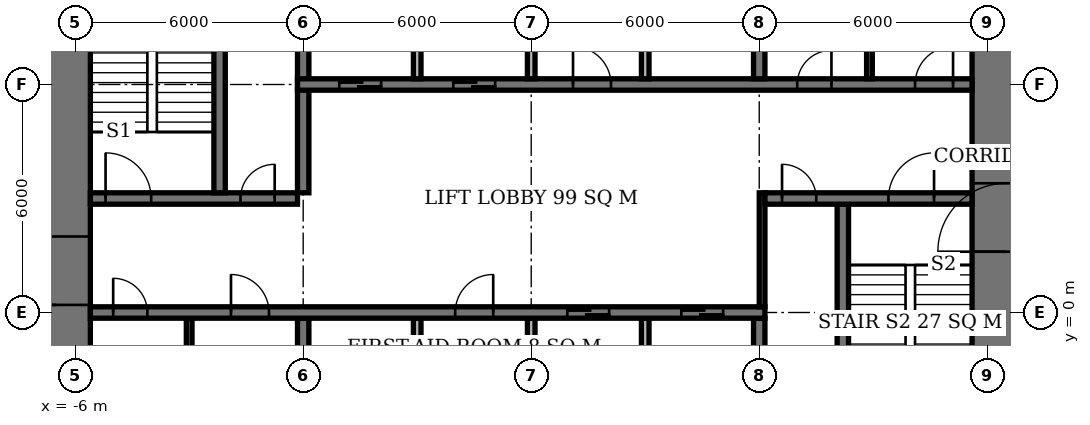
"""IFC4 building model, lengths in metres.
Left out: names, types, materials, properties, quantities, classifications, styles, units other than length and angle.
Written with IfcOpenShell. Run it as: python <this file> out.ifc"""

import sys

from ifc_helpers import new_model, si_unit, direction, frame, frame_2d, origin, place, context, subcontext, project, spatial, rectangle, extrude, element, fill, save


model = new_model("IFC4")
c1 = context("Model", 3, precision=1e-05, world=origin(), true_north=direction((0.0, 1.0)))
c2 = subcontext(c1, "Body", "Model", "MODEL_VIEW")
j1 = project(units=[si_unit("LENGTHUNIT", "METRE"), si_unit("PLANEANGLEUNIT", "RADIAN")], contexts=[c1])
p1 = place(None, origin())
s1 = spatial("IfcSite", under=j1, at=p1, CompositionType="ELEMENT")
p2 = place(p1, origin())
s2 = spatial("IfcBuilding", under=s1, at=p2, CompositionType="ELEMENT")
p3 = place(p2, frame((0.0, 0.0, 227.9)))
s3 = spatial("IfcBuildingStorey", under=s2, at=p3, CompositionType="ELEMENT", Elevation=227.9)
p4 = place(p3, frame((-6.5, -7.6, 0.0), z_axis=(0.0, 0.0, 1.0), x_axis=(0.0, 1.0, 0.0)))
e1 = element("IfcWall", 1, at=p4, inside=s3, PredefinedType="SHEAR", context=c2, shape_type="SweptSolid", body=[
    extrude(rectangle(XDim=21.2, YDim=1.8, at=frame_2d((10.6, 0.0))), origin(), (0.0, 0.0, 1.0), 3.9),
])
p5 = place(p4, frame((7.8, 0.0, 0.0)))
e2 = element("IfcOpeningElement", 2, at=p5, cuts=e1, PredefinedType="OPENING", context=c2, shape_type="SweptSolid", body=[
    extrude(rectangle(XDim=1.8, YDim=2.4, at=frame_2d((0.9, 1.2))), frame((0.0, 0.91, 0.0), z_axis=(0.0, -1.0, 0.0), x_axis=(1.0, 0.0, 0.0)), (0.0, 0.0, 1.0), 1.82),
])
p6 = place(p3, frame((18.5, -7.6, 0.0), z_axis=(0.0, 0.0, 1.0), x_axis=(0.0, 1.0, 0.0)))
e3 = element("IfcWall", 3, at=p6, inside=s3, PredefinedType="SHEAR", context=c2, shape_type="SweptSolid", body=[
    extrude(rectangle(XDim=21.2, YDim=1.8, at=frame_2d((10.6, 0.0))), origin(), (0.0, 0.0, 1.0), 3.9),
])
p7 = place(p6, frame((9.2, 0.0, 0.0)))
e4 = element("IfcOpeningElement", 4, at=p7, cuts=e3, PredefinedType="OPENING", context=c2, shape_type="SweptSolid", body=[
    extrude(rectangle(XDim=1.8, YDim=2.4, at=frame_2d((0.9, 1.2))), frame((0.0, 0.91, 0.0), z_axis=(0.0, -1.0, 0.0), x_axis=(1.0, 0.0, 0.0)), (0.0, 0.0, 1.0), 1.82),
])
p8 = place(p3, frame((-5.6, 0.0, 0.0), z_axis=(0.0, 0.0, 1.0), x_axis=(1.0, 0.0, 0.0)))
e5 = element("IfcWall", 5, at=p8, inside=s3, PredefinedType="SHEAR", context=c2, shape_type="SweptSolid", body=[
    extrude(rectangle(XDim=17.75, YDim=0.3, at=frame_2d((8.875, 0.0))), origin(), (0.0, 0.0, 1.0), 3.9),
])
p9 = place(p8, frame((0.6, 0.0, 0.0)))
e6 = element("IfcOpeningElement", 6, at=p9, cuts=e5, PredefinedType="OPENING", context=c2, shape_type="SweptSolid", body=[
    extrude(rectangle(XDim=0.9, YDim=2.1, at=frame_2d((0.45, 1.05))), frame((0.0, 0.16, 0.0), z_axis=(0.0, -1.0, 0.0), x_axis=(1.0, 0.0, 0.0)), (0.0, 0.0, 1.0), 0.32),
])
p10 = place(p8, frame((3.7, 0.0, 0.0)))
e7 = element("IfcOpeningElement", 7, at=p10, cuts=e5, PredefinedType="OPENING", context=c2, shape_type="SweptSolid", body=[
    extrude(rectangle(XDim=1.0, YDim=2.1, at=frame_2d((0.5, 1.05))), frame((0.0, 0.16, 0.0), z_axis=(0.0, -1.0, 0.0), x_axis=(1.0, 0.0, 0.0)), (0.0, 0.0, 1.0), 0.32),
])
p11 = place(p8, frame((9.6, 0.0, 0.0)))
e8 = element("IfcOpeningElement", 8, at=p11, cuts=e5, PredefinedType="OPENING", context=c2, shape_type="SweptSolid", body=[
    extrude(rectangle(XDim=1.0, YDim=2.1, at=frame_2d((0.5, 1.05))), frame((0.0, 0.16, 0.0), z_axis=(0.0, -1.0, 0.0), x_axis=(1.0, 0.0, 0.0)), (0.0, 0.0, 1.0), 0.32),
])
p12 = place(p8, frame((12.55, 0.0, 0.0)))
e9 = element("IfcOpeningElement", 9, at=p12, cuts=e5, PredefinedType="OPENING", context=c2, shape_type="SweptSolid", body=[
    extrude(rectangle(XDim=1.1, YDim=2.1, at=frame_2d((0.55, 1.05))), frame((0.0, 0.16, 0.0), z_axis=(0.0, -1.0, 0.0), x_axis=(1.0, 0.0, 0.0)), (0.0, 0.0, 1.0), 0.32),
])
p13 = place(p8, frame((15.55, 0.0, 0.0)))
e10 = element("IfcOpeningElement", 10, at=p13, cuts=e5, PredefinedType="OPENING", context=c2, shape_type="SweptSolid", body=[
    extrude(rectangle(XDim=1.1, YDim=2.1, at=frame_2d((0.55, 1.05))), frame((0.0, 0.16, 0.0), z_axis=(0.0, -1.0, 0.0), x_axis=(1.0, 0.0, 0.0)), (0.0, 0.0, 1.0), 0.32),
])
p14 = place(p3, frame((-5.6, 3.0, 0.0), z_axis=(0.0, 0.0, 1.0), x_axis=(1.0, 0.0, 0.0)))
e11 = element("IfcWall", 11, at=p14, inside=s3, PredefinedType="SHEAR", context=c2, shape_type="SweptSolid", body=[
    extrude(rectangle(XDim=5.45, YDim=0.3, at=frame_2d((2.725, 0.0))), origin(), (0.0, 0.0, 1.0), 3.9),
])
p15 = place(p14, frame((0.4, 0.0, 0.0)))
e12 = element("IfcOpeningElement", 12, at=p15, cuts=e11, PredefinedType="OPENING", context=c2, shape_type="SweptSolid", body=[
    extrude(rectangle(XDim=1.2, YDim=2.1, at=frame_2d((0.6, 1.05))), frame((0.0, 0.16, 0.0), z_axis=(0.0, -1.0, 0.0), x_axis=(1.0, 0.0, 0.0)), (0.0, 0.0, 1.0), 0.32),
])
p16 = place(p14, frame((3.95, 0.0, 0.0)))
e13 = element("IfcOpeningElement", 13, at=p16, cuts=e11, PredefinedType="OPENING", context=c2, shape_type="SweptSolid", body=[
    extrude(rectangle(XDim=0.9, YDim=2.1, at=frame_2d((0.45, 1.05))), frame((0.0, 0.16, 0.0), z_axis=(0.0, -1.0, 0.0), x_axis=(1.0, 0.0, 0.0)), (0.0, 0.0, 1.0), 0.32),
])
p17 = place(p3, frame((12.15, 3.0, 0.0), z_axis=(0.0, 0.0, 1.0), x_axis=(1.0, 0.0, 0.0)))
e14 = element("IfcWall", 14, at=p17, inside=s3, PredefinedType="SHEAR", context=c2, shape_type="SweptSolid", body=[
    extrude(rectangle(XDim=5.45, YDim=0.3, at=frame_2d((2.725, 0.0))), origin(), (0.0, 0.0, 1.0), 3.9),
])
p18 = place(p17, frame((3.25, 0.0, 0.0)))
e15 = element("IfcOpeningElement", 15, at=p18, cuts=e14, PredefinedType="OPENING", context=c2, shape_type="SweptSolid", body=[
    extrude(rectangle(XDim=1.2, YDim=2.1, at=frame_2d((0.6, 1.05))), frame((0.0, 0.16, 0.0), z_axis=(0.0, -1.0, 0.0), x_axis=(1.0, 0.0, 0.0)), (0.0, 0.0, 1.0), 0.32),
])
p19 = place(p17, frame((0.45, 0.0, 0.0)))
e16 = element("IfcOpeningElement", 16, at=p19, cuts=e14, PredefinedType="OPENING", context=c2, shape_type="SweptSolid", body=[
    extrude(rectangle(XDim=0.9, YDim=2.1, at=frame_2d((0.45, 1.05))), frame((0.0, 0.16, 0.0), z_axis=(0.0, -1.0, 0.0), x_axis=(1.0, 0.0, 0.0)), (0.0, 0.0, 1.0), 0.32),
])
p20 = place(p3, frame((-0.15, 6.0, 0.0), z_axis=(0.0, 0.0, 1.0), x_axis=(1.0, 0.0, 0.0)))
e17 = element("IfcWall", 17, at=p20, inside=s3, PredefinedType="SHEAR", context=c2, shape_type="SweptSolid", body=[
    extrude(rectangle(XDim=17.75, YDim=0.3, at=frame_2d((8.875, 0.0))), origin(), (0.0, 0.0, 1.0), 3.9),
])
p21 = place(p20, frame((13.15, 0.0, 0.0)))
e18 = element("IfcOpeningElement", 18, at=p21, cuts=e17, PredefinedType="OPENING", context=c2, shape_type="SweptSolid", body=[
    extrude(rectangle(XDim=0.9, YDim=2.1, at=frame_2d((0.45, 1.05))), frame((0.0, 0.16, 0.0), z_axis=(0.0, -1.0, 0.0), x_axis=(1.0, 0.0, 0.0)), (0.0, 0.0, 1.0), 0.32),
])
p22 = place(p20, frame((16.25, 0.0, 0.0)))
e19 = element("IfcOpeningElement", 19, at=p22, cuts=e17, PredefinedType="OPENING", context=c2, shape_type="SweptSolid", body=[
    extrude(rectangle(XDim=1.0, YDim=2.1, at=frame_2d((0.5, 1.05))), frame((0.0, 0.16, 0.0), z_axis=(0.0, -1.0, 0.0), x_axis=(1.0, 0.0, 0.0)), (0.0, 0.0, 1.0), 0.32),
])
p23 = place(p20, frame((7.25, 0.0, 0.0)))
e20 = element("IfcOpeningElement", 20, at=p23, cuts=e17, PredefinedType="OPENING", context=c2, shape_type="SweptSolid", body=[
    extrude(rectangle(XDim=1.0, YDim=2.1, at=frame_2d((0.5, 1.05))), frame((0.0, 0.16, 0.0), z_axis=(0.0, -1.0, 0.0), x_axis=(1.0, 0.0, 0.0)), (0.0, 0.0, 1.0), 0.32),
])
p24 = place(p20, frame((1.1, 0.0, 0.0)))
e21 = element("IfcOpeningElement", 21, at=p24, cuts=e17, PredefinedType="OPENING", context=c2, shape_type="SweptSolid", body=[
    extrude(rectangle(XDim=1.1, YDim=2.1, at=frame_2d((0.55, 1.05))), frame((0.0, 0.16, 0.0), z_axis=(0.0, -1.0, 0.0), x_axis=(1.0, 0.0, 0.0)), (0.0, 0.0, 1.0), 0.32),
])
p25 = place(p20, frame((4.1, 0.0, 0.0)))
e22 = element("IfcOpeningElement", 22, at=p25, cuts=e17, PredefinedType="OPENING", context=c2, shape_type="SweptSolid", body=[
    extrude(rectangle(XDim=1.1, YDim=2.1, at=frame_2d((0.55, 1.05))), frame((0.0, 0.16, 0.0), z_axis=(0.0, -1.0, 0.0), x_axis=(1.0, 0.0, 0.0)), (0.0, 0.0, 1.0), 0.32),
])
p26 = place(p3, frame((0.0, -5.6, 0.0), z_axis=(0.0, 0.0, 1.0), x_axis=(0.0, 1.0, 0.0)))
e23 = element("IfcWall", 23, at=p26, inside=s3, PredefinedType="SHEAR", context=c2, shape_type="SweptSolid", body=[
    extrude(rectangle(XDim=5.45, YDim=0.3, at=frame_2d((2.725, 0.0))), origin(), (0.0, 0.0, 1.0), 3.9),
])
p27 = place(p3, frame((0.0, 3.15, 0.0), z_axis=(0.0, 0.0, 1.0), x_axis=(0.0, 1.0, 0.0)))
e24 = element("IfcWall", 24, at=p27, inside=s3, PredefinedType="SHEAR", context=c2, shape_type="SweptSolid", body=[
    extrude(rectangle(XDim=8.45, YDim=0.3, at=frame_2d((4.225, 0.0))), origin(), (0.0, 0.0, 1.0), 3.9),
])
for number, where, z_axis, x_axis in (
    (25, (12.0, -5.6, 0.0), (0.0, 0.0, 1.0), (0.0, 1.0, 0.0)),
    (26, (12.0, 6.15, 0.0), (0.0, 0.0, 1.0), (0.0, 1.0, 0.0)),
):
    element("IfcWall", number, at=place(p3, frame(where, z_axis=z_axis, x_axis=x_axis)), inside=s3, PredefinedType="SHEAR", context=c2, shape_type="SweptSolid", body=[
        extrude(rectangle(XDim=5.45, YDim=0.3, at=frame_2d((2.725, 0.0))), origin(), (0.0, 0.0, 1.0), 3.9),
    ])
for number, where, z_axis, x_axis in (
    (27, (-2.2, 3.15, 0.0), (0.0, 0.0, 1.0), (0.0, 1.0, 0.0)),
    (28, (14.2, -5.6, 0.0), (0.0, 0.0, 1.0), (0.0, 1.0, 0.0)),
):
    element("IfcWall", number, at=place(p3, frame(where, z_axis=z_axis, x_axis=x_axis)), inside=s3, PredefinedType="SHEAR", context=c2, shape_type="SweptSolid", body=[
        extrude(rectangle(XDim=8.45, YDim=0.3, at=frame_2d((4.225, 0.0))), origin(), (0.0, 0.0, 1.0), 3.9),
    ])
for number, where, z_axis, x_axis in (
    (29, (3.0, 6.15, 0.0), (0.0, 0.0, 1.0), (0.0, 1.0, 0.0)),
    (30, (6.0, 6.15, 0.0), (0.0, 0.0, 1.0), (0.0, 1.0, 0.0)),
    (31, (9.0, 6.15, 0.0), (0.0, 0.0, 1.0), (0.0, 1.0, 0.0)),
    (32, (3.0, -5.6, 0.0), (0.0, 0.0, 1.0), (0.0, 1.0, 0.0)),
    (33, (6.0, -5.6, 0.0), (0.0, 0.0, 1.0), (0.0, 1.0, 0.0)),
    (34, (9.0, -5.6, 0.0), (0.0, 0.0, 1.0), (0.0, 1.0, 0.0)),
):
    element("IfcWall", number, at=place(p3, frame(where, z_axis=z_axis, x_axis=x_axis)), inside=s3, PredefinedType="SOLIDWALL", context=c2, shape_type="SweptSolid", body=[
        extrude(rectangle(XDim=5.45, YDim=0.2, at=frame_2d((2.725, 0.0))), origin(), (0.0, 0.0, 1.0), 3.9),
    ])
for number, where, z_axis, x_axis in (
    (35, (-3.0, -5.6, 0.0), (0.0, 0.0, 1.0), (0.0, 1.0, 0.0)),
    (36, (14.9, 6.15, 0.0), (0.0, 0.0, 1.0), (0.0, 1.0, 0.0)),
):
    element("IfcWall", number, at=place(p3, frame(where, z_axis=z_axis, x_axis=x_axis)), inside=s3, PredefinedType="PLUMBINGWALL", context=c2, shape_type="SweptSolid", body=[
        extrude(rectangle(XDim=5.45, YDim=0.15, at=frame_2d((2.725, 0.0))), origin(), (0.0, 0.0, 1.0), 3.65),
    ])
p28 = place(p3, frame((12.075, 0.15, 0.0), z_axis=(0.0, 0.0, 1.0), x_axis=(0.0, 1.0, 0.0)))
e37 = element("IfcWall", 37, at=p28, inside=s3, PredefinedType="PARTITIONING", context=c2, shape_type="SweptSolid", body=[
    extrude(rectangle(XDim=3.0, YDim=0.15, at=frame_2d((1.5, 0.0))), origin(), (0.0, 0.0, 1.0), 3.65),
])
p29 = place(p5, origin())
e38 = element("IfcDoor", 38, at=p29, inside=s3, OperationType="DOUBLE_DOOR_SINGLE_SWING", PredefinedType="DOOR", context=c2, shape_type="SweptSolid", body=[
    extrude(rectangle(XDim=1.8, YDim=2.4, at=frame_2d((0.9, 1.2))), frame((0.0, 0.025, 0.0), z_axis=(0.0, -1.0, 0.0), x_axis=(1.0, 0.0, 0.0)), (0.0, 0.0, 1.0), 0.05),
])
fill(e2, e38)
p30 = place(p7, origin())
e39 = element("IfcDoor", 39, at=p30, inside=s3, OperationType="DOUBLE_DOOR_SINGLE_SWING", PredefinedType="DOOR", context=c2, shape_type="SweptSolid", body=[
    extrude(rectangle(XDim=1.8, YDim=2.4, at=frame_2d((0.9, 1.2))), frame((0.0, 0.025, 0.0), z_axis=(0.0, -1.0, 0.0), x_axis=(1.0, 0.0, 0.0)), (0.0, 0.0, 1.0), 0.05),
])
fill(e4, e39)
p31 = place(p15, origin())
e40 = element("IfcDoor", 40, at=p31, inside=s3, OperationType="SINGLE_SWING_LEFT", PredefinedType="DOOR", context=c2, shape_type="SweptSolid", body=[
    extrude(rectangle(XDim=1.2, YDim=2.1, at=frame_2d((0.6, 1.05))), frame((0.0, 0.025, 0.0), z_axis=(0.0, -1.0, 0.0), x_axis=(1.0, 0.0, 0.0)), (0.0, 0.0, 1.0), 0.05),
])
fill(e12, e40)
p32 = place(p16, origin())
e41 = element("IfcDoor", 41, at=p32, inside=s3, OperationType="SINGLE_SWING_RIGHT", PredefinedType="DOOR", context=c2, shape_type="SweptSolid", body=[
    extrude(rectangle(XDim=0.9, YDim=2.1, at=frame_2d((0.45, 1.05))), frame((0.0, 0.025, 0.0), z_axis=(0.0, -1.0, 0.0), x_axis=(1.0, 0.0, 0.0)), (0.0, 0.0, 1.0), 0.05),
])
fill(e13, e41)
p33 = place(p18, origin())
e42 = element("IfcDoor", 42, at=p33, inside=s3, OperationType="SINGLE_SWING_RIGHT", PredefinedType="DOOR", context=c2, shape_type="SweptSolid", body=[
    extrude(rectangle(XDim=1.2, YDim=2.1, at=frame_2d((0.6, 1.05))), frame((0.0, 0.025, 0.0), z_axis=(0.0, -1.0, 0.0), x_axis=(1.0, 0.0, 0.0)), (0.0, 0.0, 1.0), 0.05),
])
fill(e15, e42)
p34 = place(p19, origin())
e43 = element("IfcDoor", 43, at=p34, inside=s3, OperationType="SINGLE_SWING_LEFT", PredefinedType="DOOR", context=c2, shape_type="SweptSolid", body=[
    extrude(rectangle(XDim=0.9, YDim=2.1, at=frame_2d((0.45, 1.05))), frame((0.0, 0.025, 0.0), z_axis=(0.0, -1.0, 0.0), x_axis=(1.0, 0.0, 0.0)), (0.0, 0.0, 1.0), 0.05),
])
fill(e16, e43)
p35 = place(p9, origin())
e44 = element("IfcDoor", 44, at=p35, inside=s3, OperationType="SINGLE_SWING_LEFT", PredefinedType="DOOR", context=c2, shape_type="SweptSolid", body=[
    extrude(rectangle(XDim=0.9, YDim=2.1, at=frame_2d((0.45, 1.05))), frame((0.0, 0.025, 0.0), z_axis=(0.0, -1.0, 0.0), x_axis=(1.0, 0.0, 0.0)), (0.0, 0.0, 1.0), 0.05),
])
fill(e6, e44)
p36 = place(p10, origin())
e45 = element("IfcDoor", 45, at=p36, inside=s3, OperationType="SINGLE_SWING_LEFT", PredefinedType="DOOR", context=c2, shape_type="SweptSolid", body=[
    extrude(rectangle(XDim=1.0, YDim=2.1, at=frame_2d((0.5, 1.05))), frame((0.0, 0.025, 0.0), z_axis=(0.0, -1.0, 0.0), x_axis=(1.0, 0.0, 0.0)), (0.0, 0.0, 1.0), 0.05),
])
fill(e7, e45)
p37 = place(p21, origin())
e46 = element("IfcDoor", 46, at=p37, inside=s3, OperationType="SINGLE_SWING_RIGHT", PredefinedType="DOOR", context=c2, shape_type="SweptSolid", body=[
    extrude(rectangle(XDim=0.9, YDim=2.1, at=frame_2d((0.45, 1.05))), frame((0.0, 0.025, 0.0), z_axis=(0.0, -1.0, 0.0), x_axis=(1.0, 0.0, 0.0)), (0.0, 0.0, 1.0), 0.05),
])
fill(e18, e46)
p38 = place(p22, origin())
e47 = element("IfcDoor", 47, at=p38, inside=s3, OperationType="SINGLE_SWING_RIGHT", PredefinedType="DOOR", context=c2, shape_type="SweptSolid", body=[
    extrude(rectangle(XDim=1.0, YDim=2.1, at=frame_2d((0.5, 1.05))), frame((0.0, 0.025, 0.0), z_axis=(0.0, -1.0, 0.0), x_axis=(1.0, 0.0, 0.0)), (0.0, 0.0, 1.0), 0.05),
])
fill(e19, e47)
p39 = place(p23, origin())
e48 = element("IfcDoor", 48, at=p39, inside=s3, OperationType="SINGLE_SWING_LEFT", PredefinedType="DOOR", context=c2, shape_type="SweptSolid", body=[
    extrude(rectangle(XDim=1.0, YDim=2.1, at=frame_2d((0.5, 1.05))), frame((0.0, 0.025, 0.0), z_axis=(0.0, -1.0, 0.0), x_axis=(1.0, 0.0, 0.0)), (0.0, 0.0, 1.0), 0.05),
])
fill(e20, e48)
p40 = place(p11, origin())
e49 = element("IfcDoor", 49, at=p40, inside=s3, OperationType="SINGLE_SWING_RIGHT", PredefinedType="DOOR", context=c2, shape_type="SweptSolid", body=[
    extrude(rectangle(XDim=1.0, YDim=2.1, at=frame_2d((0.5, 1.05))), frame((0.0, 0.025, 0.0), z_axis=(0.0, -1.0, 0.0), x_axis=(1.0, 0.0, 0.0)), (0.0, 0.0, 1.0), 0.05),
])
fill(e8, e49)
p41 = place(p24, origin())
e50 = element("IfcDoor", 50, at=p41, inside=s3, OperationType="DOUBLE_DOOR_SLIDING", PredefinedType="USERDEFINED", context=c2, shape_type="SweptSolid", body=[
    extrude(rectangle(XDim=1.1, YDim=2.1, at=frame_2d((0.55, 1.05))), frame((0.0, 0.025, 0.0), z_axis=(0.0, -1.0, 0.0), x_axis=(1.0, 0.0, 0.0)), (0.0, 0.0, 1.0), 0.05),
])
fill(e21, e50)
p42 = place(p25, origin())
e51 = element("IfcDoor", 51, at=p42, inside=s3, OperationType="DOUBLE_DOOR_SLIDING", PredefinedType="USERDEFINED", context=c2, shape_type="SweptSolid", body=[
    extrude(rectangle(XDim=1.1, YDim=2.1, at=frame_2d((0.55, 1.05))), frame((0.0, 0.025, 0.0), z_axis=(0.0, -1.0, 0.0), x_axis=(1.0, 0.0, 0.0)), (0.0, 0.0, 1.0), 0.05),
])
fill(e22, e51)
p43 = place(p12, origin())
e52 = element("IfcDoor", 52, at=p43, inside=s3, OperationType="DOUBLE_DOOR_SLIDING", PredefinedType="USERDEFINED", context=c2, shape_type="SweptSolid", body=[
    extrude(rectangle(XDim=1.1, YDim=2.1, at=frame_2d((0.55, 1.05))), frame((0.0, 0.025, 0.0), z_axis=(0.0, -1.0, 0.0), x_axis=(1.0, 0.0, 0.0)), (0.0, 0.0, 1.0), 0.05),
])
fill(e9, e52)
p44 = place(p13, origin())
e53 = element("IfcDoor", 53, at=p44, inside=s3, OperationType="DOUBLE_DOOR_SLIDING", PredefinedType="USERDEFINED", context=c2, shape_type="SweptSolid", body=[
    extrude(rectangle(XDim=1.1, YDim=2.1, at=frame_2d((0.55, 1.05))), frame((0.0, 0.025, 0.0), z_axis=(0.0, -1.0, 0.0), x_axis=(1.0, 0.0, 0.0)), (0.0, 0.0, 1.0), 0.05),
])
fill(e10, e53)
save(model, sys.argv[1])
